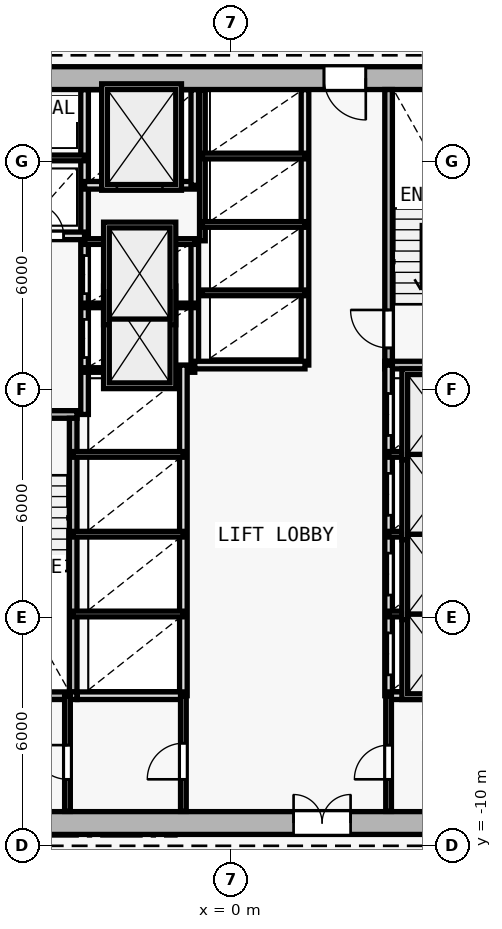
"""IFC4 building model, lengths in metres.
Left out: names, types, materials, properties, quantities, classifications, styles, units other than length and angle.
Written with IfcOpenShell. Run it as: python <this file> out.ifc"""

import sys

from ifc_helpers import new_model, si_unit, direction, frame, frame_2d, origin, origin_2d, place, context, subcontext, project, spatial, rectangle, i_section, extrude, element, fill, save


model = new_model("IFC4")
c1 = context("Model", 3, precision=1e-05, world=origin(), true_north=direction((0.0, 1.0)))
c2 = subcontext(c1, "Body", "Model", "MODEL_VIEW")
j1 = project(units=[si_unit("LENGTHUNIT", "METRE"), si_unit("PLANEANGLEUNIT", "RADIAN")], contexts=[c1])
p1 = place(None, origin())
s1 = spatial("IfcSite", under=j1, at=p1, CompositionType="ELEMENT")
p2 = place(p1, origin())
s2 = spatial("IfcBuilding", under=s1, at=p2, CompositionType="ELEMENT")
p3 = place(p2, frame((0.0, 0.0, 62.4)))
s3 = spatial("IfcBuildingStorey", under=s2, at=p3, CompositionType="ELEMENT", Elevation=62.4)
p4 = place(p3, frame((0.0, -9.4, 0.0), z_axis=(0.0, 0.0, 1.0), x_axis=(1.0, 0.0, 0.0)))
e1 = element("IfcColumn", 1, at=p4, inside=s3, PredefinedType="COLUMN", context=c2, shape_type="SweptSolid", body=[
    extrude(i_section(OverallWidth=0.416, OverallDepth=0.446, WebThickness=0.025, FlangeThickness=0.04, FilletRadius=0.015, at=origin_2d()), origin(), (0.0, 0.0, 1.0), 3.6),
])
p5 = place(p3, frame((-8.0, -9.4, 0.0), z_axis=(0.0, 0.0, 1.0), x_axis=(1.0, 0.0, 0.0)))
e2 = element("IfcWall", 2, at=p5, inside=s3, PredefinedType="SHEAR", context=c2, shape_type="SweptSolid", body=[
    extrude(rectangle(XDim=16.0, YDim=0.6, at=frame_2d((8.0, 0.0))), origin(), (0.0, 0.0, 1.0), 3.35),
])
p6 = place(p5, frame((9.65, 0.0, 0.0)))
e3 = element("IfcOpeningElement", 3, at=p6, cuts=e2, PredefinedType="OPENING", context=c2, shape_type="SweptSolid", body=[
    extrude(rectangle(XDim=1.5, YDim=2.2, at=frame_2d((0.75, 1.1))), frame((0.0, 0.31, 0.0), z_axis=(0.0, -1.0, 0.0), x_axis=(1.0, 0.0, 0.0)), (0.0, 0.0, 1.0), 0.62),
])
p7 = place(p3, frame((8.0, 10.2, 0.0), z_axis=(0.0, 0.0, 1.0), x_axis=(-1.0, 0.0, 0.0)))
e4 = element("IfcWall", 4, at=p7, inside=s3, PredefinedType="SHEAR", context=c2, shape_type="SweptSolid", body=[
    extrude(rectangle(XDim=16.0, YDim=0.6, at=frame_2d((8.0, 0.0))), origin(), (0.0, 0.0, 1.0), 3.35),
])
p8 = place(p7, frame((4.45, 0.0, 0.0)))
e5 = element("IfcOpeningElement", 5, at=p8, cuts=e4, PredefinedType="OPENING", context=c2, shape_type="SweptSolid", body=[
    extrude(rectangle(XDim=1.1, YDim=2.15, at=frame_2d((0.55, 1.075))), frame((0.0, 0.31, 0.0), z_axis=(0.0, -1.0, 0.0), x_axis=(1.0, 0.0, 0.0)), (0.0, 0.0, 1.0), 0.62),
])
p9 = place(p3, frame((-7.4, 1.35, 0.0), z_axis=(0.0, 0.0, 1.0), x_axis=(1.0, 0.0, 0.0)))
e6 = element("IfcWall", 6, at=p9, inside=s3, PredefinedType="SOLIDWALL", context=c2, shape_type="SweptSolid", body=[
    extrude(rectangle(XDim=3.35, YDim=0.2, at=frame_2d((1.675, 0.0))), origin(), (0.0, 0.0, 1.0), 3.35),
])
p10 = place(p9, frame((0.65, 0.0, 0.0)))
e7 = element("IfcOpeningElement", 7, at=p10, cuts=e6, PredefinedType="OPENING", context=c2, shape_type="SweptSolid", body=[
    extrude(rectangle(XDim=1.0, YDim=2.15, at=frame_2d((0.5, 1.075))), frame((0.0, 0.11, 0.0), z_axis=(0.0, -1.0, 0.0), x_axis=(1.0, 0.0, 0.0)), (0.0, 0.0, 1.0), 0.22),
])
p11 = place(p3, frame((-4.15, -5.95, 0.0), z_axis=(0.0, 0.0, 1.0), x_axis=(0.0, 1.0, 0.0)))
e8 = element("IfcWall", 8, at=p11, inside=s3, PredefinedType="SOLIDWALL", context=c2, shape_type="SweptSolid", body=[
    extrude(rectangle(XDim=7.2, YDim=0.2, at=frame_2d((3.6, 0.0))), origin(), (0.0, 0.0, 1.0), 3.35),
])
p12 = place(p3, frame((-3.85, 1.35, 0.0), z_axis=(0.0, 0.0, 1.0), x_axis=(0.0, 1.0, 0.0)))
e9 = element("IfcWall", 9, at=p12, inside=s3, PredefinedType="SOLIDWALL", context=c2, shape_type="SweptSolid", body=[
    extrude(rectangle(XDim=8.545, YDim=0.2, at=frame_2d((4.272, 0.0))), origin(), (0.0, 0.0, 1.0), 3.35),
])
p13 = place(p12, frame((1.5, 0.0, 0.0)))
e10 = element("IfcOpeningElement", 10, at=p13, cuts=e9, PredefinedType="OPENING", context=c2, shape_type="SweptSolid", body=[
    extrude(rectangle(XDim=1.0, YDim=2.15, at=frame_2d((0.5, 1.075))), frame((0.0, 0.11, 0.0), z_axis=(0.0, -1.0, 0.0), x_axis=(1.0, 0.0, 0.0)), (0.0, 0.0, 1.0), 0.22),
])
p14 = place(p12, frame((3.18, 0.0, 0.0)))
e11 = element("IfcOpeningElement", 11, at=p14, cuts=e9, PredefinedType="OPENING", context=c2, shape_type="SweptSolid", body=[
    extrude(rectangle(XDim=1.0, YDim=2.15, at=frame_2d((0.5, 1.075))), frame((0.0, 0.11, 0.0), z_axis=(0.0, -1.0, 0.0), x_axis=(1.0, 0.0, 0.0)), (0.0, 0.0, 1.0), 0.22),
])
p15 = place(p3, frame((-7.395, 6.05, 0.0), z_axis=(0.0, 0.0, 1.0), x_axis=(1.0, 0.0, 0.0)))
e12 = element("IfcWall", 12, at=p15, inside=s3, PredefinedType="SOLIDWALL", context=c2, shape_type="SweptSolid", body=[
    extrude(rectangle(XDim=3.545, YDim=0.2, at=frame_2d((1.772, 0.0))), origin(), (0.0, 0.0, 1.0), 3.35),
])
p16 = place(p15, frame((0.345, 0.0, 0.0)))
e13 = element("IfcOpeningElement", 13, at=p16, cuts=e12, PredefinedType="OPENING", context=c2, shape_type="SweptSolid", body=[
    extrude(rectangle(XDim=0.85, YDim=2.1, at=frame_2d((0.425, 1.05))), frame((0.0, 0.11, 0.0), z_axis=(0.0, -1.0, 0.0), x_axis=(1.0, 0.0, 0.0)), (0.0, 0.0, 1.0), 0.22),
])
p17 = place(p15, frame((2.145, 0.0, 0.0)))
e14 = element("IfcOpeningElement", 14, at=p17, cuts=e12, PredefinedType="OPENING", context=c2, shape_type="SweptSolid", body=[
    extrude(rectangle(XDim=0.85, YDim=2.1, at=frame_2d((0.425, 1.05))), frame((0.0, 0.11, 0.0), z_axis=(0.0, -1.0, 0.0), x_axis=(1.0, 0.0, 0.0)), (0.0, 0.0, 1.0), 0.22),
])
p18 = place(p3, frame((-7.395, 8.1, 0.0), z_axis=(0.0, 0.0, 1.0), x_axis=(1.0, 0.0, 0.0)))
e15 = element("IfcWall", 15, at=p18, inside=s3, PredefinedType="PARTITIONING", context=c2, shape_type="SweptSolid", body=[
    extrude(rectangle(XDim=3.545, YDim=0.15, at=frame_2d((1.772, 0.0))), origin(), (0.0, 0.0, 1.0), 3.35),
])
p19 = place(p3, frame((4.15, 2.75, 0.0), z_axis=(0.0, 0.0, 1.0), x_axis=(0.0, 1.0, 0.0)))
e16 = element("IfcWall", 16, at=p19, inside=s3, PredefinedType="SOLIDWALL", context=c2, shape_type="SweptSolid", body=[
    extrude(rectangle(XDim=7.15, YDim=0.2, at=frame_2d((3.575, 0.0))), origin(), (0.0, 0.0, 1.0), 3.35),
])
p20 = place(p19, frame((0.35, 0.0, 0.0)))
e17 = element("IfcOpeningElement", 17, at=p20, cuts=e16, PredefinedType="OPENING", context=c2, shape_type="SweptSolid", body=[
    extrude(rectangle(XDim=1.0, YDim=2.15, at=frame_2d((0.5, 1.075))), frame((0.0, 0.11, 0.0), z_axis=(0.0, -1.0, 0.0), x_axis=(1.0, 0.0, 0.0)), (0.0, 0.0, 1.0), 0.22),
])
p21 = place(p3, frame((4.05, 2.65, 0.0), z_axis=(0.0, 0.0, 1.0), x_axis=(1.0, 0.0, 0.0)))
e18 = element("IfcWall", 18, at=p21, inside=s3, PredefinedType="SOLIDWALL", context=c2, shape_type="SweptSolid", body=[
    extrude(rectangle(XDim=3.35, YDim=0.2, at=frame_2d((1.675, 0.0))), origin(), (0.0, 0.0, 1.0), 3.35),
])
p22 = place(p3, frame((-0.95, 2.65, 0.0), z_axis=(0.0, 0.0, 1.0), x_axis=(0.0, 1.0, 0.0)))
e19 = element("IfcWall", 19, at=p22, inside=s3, PredefinedType="SOLIDWALL", context=c2, shape_type="SweptSolid", body=[
    extrude(rectangle(XDim=3.27, YDim=0.2, at=frame_2d((1.635, 0.0))), origin(), (0.0, 0.0, 1.0), 3.35),
])
for number, where, z_axis, x_axis in (
    (20, (-3.85, 2.52, 0.0), (0.0, 0.0, 1.0), (1.0, 0.0, 0.0)),
    (21, (-3.85, 4.22, 0.0), (0.0, 0.0, 1.0), (1.0, 0.0, 0.0)),
):
    element("IfcWall", number, at=place(p3, frame(where, z_axis=z_axis, x_axis=x_axis)), inside=s3, PredefinedType="PARTITIONING", context=c2, shape_type="SweptSolid", body=[
        extrude(rectangle(XDim=2.9, YDim=0.12, at=frame_2d((1.45, 0.0))), origin(), (0.0, 0.0, 1.0), 3.35),
    ])
p23 = place(p3, frame((-3.85, 5.9, 0.0), z_axis=(0.0, 0.0, 1.0), x_axis=(1.0, 0.0, 0.0)))
e22 = element("IfcWall", 22, at=p23, inside=s3, PredefinedType="PARTITIONING", context=c2, shape_type="SweptSolid", body=[
    extrude(rectangle(XDim=2.9, YDim=0.15, at=frame_2d((1.45, 0.0))), origin(), (0.0, 0.0, 1.0), 3.35),
])
p24 = place(p3, frame((-3.85, 7.38, 0.0), z_axis=(0.0, 0.0, 1.0), x_axis=(1.0, 0.0, 0.0)))
e23 = element("IfcWall", 23, at=p24, inside=s3, PredefinedType="SOLIDWALL", context=c2, shape_type="SweptSolid", body=[
    extrude(rectangle(XDim=2.9, YDim=0.2, at=frame_2d((1.45, 0.0))), origin(), (0.0, 0.0, 1.0), 3.35),
])
p25 = place(p24, frame((0.85, 0.0, 0.0)))
e24 = element("IfcOpeningElement", 24, at=p25, cuts=e23, PredefinedType="OPENING", context=c2, shape_type="SweptSolid", body=[
    extrude(rectangle(XDim=1.2, YDim=2.2, at=frame_2d((0.6, 1.1))), frame((0.0, 0.11, 0.0), z_axis=(0.0, -1.0, 0.0), x_axis=(1.0, 0.0, 0.0)), (0.0, 0.0, 1.0), 0.22),
])
p26 = place(p3, frame((-0.95, 7.38, 0.0), z_axis=(0.0, 0.0, 1.0), x_axis=(0.0, 1.0, 0.0)))
e25 = element("IfcWall", 25, at=p26, inside=s3, PredefinedType="SOLIDWALL", context=c2, shape_type="SweptSolid", body=[
    extrude(rectangle(XDim=2.515, YDim=0.2, at=frame_2d((1.258, 0.0))), origin(), (0.0, 0.0, 1.0), 3.35),
])
p27 = place(p3, frame((4.15, -6.05, 0.0), z_axis=(0.0, 0.0, 1.0), x_axis=(0.0, 1.0, 0.0)))
e26 = element("IfcWall", 26, at=p27, inside=s3, PredefinedType="SOLIDWALL", context=c2, shape_type="SweptSolid", body=[
    extrude(rectangle(XDim=8.7, YDim=0.2, at=frame_2d((4.35, 0.0))), origin(), (0.0, 0.0, 1.0), 3.35),
])
p28 = place(p27, frame((0.55, 0.0, 0.0)))
e27 = element("IfcOpeningElement", 27, at=p28, cuts=e26, PredefinedType="OPENING", context=c2, shape_type="SweptSolid", body=[
    extrude(rectangle(XDim=1.1, YDim=2.15, at=frame_2d((0.55, 1.075))), frame((0.0, 0.11, 0.0), z_axis=(0.0, -1.0, 0.0), x_axis=(1.0, 0.0, 0.0)), (0.0, 0.0, 1.0), 0.22),
])
p29 = place(p27, frame((2.65, 0.0, 0.0)))
e28 = element("IfcOpeningElement", 28, at=p29, cuts=e26, PredefinedType="OPENING", context=c2, shape_type="SweptSolid", body=[
    extrude(rectangle(XDim=1.1, YDim=2.15, at=frame_2d((0.55, 1.075))), frame((0.0, 0.11, 0.0), z_axis=(0.0, -1.0, 0.0), x_axis=(1.0, 0.0, 0.0)), (0.0, 0.0, 1.0), 0.22),
])
p30 = place(p27, frame((4.75, 0.0, 0.0)))
e29 = element("IfcOpeningElement", 29, at=p30, cuts=e26, PredefinedType="OPENING", context=c2, shape_type="SweptSolid", body=[
    extrude(rectangle(XDim=1.1, YDim=2.15, at=frame_2d((0.55, 1.075))), frame((0.0, 0.11, 0.0), z_axis=(0.0, -1.0, 0.0), x_axis=(1.0, 0.0, 0.0)), (0.0, 0.0, 1.0), 0.22),
])
p31 = place(p27, frame((6.85, 0.0, 0.0)))
e30 = element("IfcOpeningElement", 30, at=p31, cuts=e26, PredefinedType="OPENING", context=c2, shape_type="SweptSolid", body=[
    extrude(rectangle(XDim=1.1, YDim=2.15, at=frame_2d((0.55, 1.075))), frame((0.0, 0.11, 0.0), z_axis=(0.0, -1.0, 0.0), x_axis=(1.0, 0.0, 0.0)), (0.0, 0.0, 1.0), 0.22),
])
for number, where, z_axis, x_axis in (
    (31, (4.15, -3.9, 0.0), (0.0, 0.0, 1.0), (1.0, 0.0, 0.0)),
    (32, (4.15, -1.8, 0.0), (0.0, 0.0, 1.0), (1.0, 0.0, 0.0)),
    (33, (4.15, 0.3, 0.0), (0.0, 0.0, 1.0), (1.0, 0.0, 0.0)),
):
    element("IfcWall", number, at=place(p3, frame(where, z_axis=z_axis, x_axis=x_axis)), inside=s3, PredefinedType="PARTITIONING", context=c2, shape_type="SweptSolid", body=[
        extrude(rectangle(XDim=2.6, YDim=0.15, at=frame_2d((1.3, 0.0))), origin(), (0.0, 0.0, 1.0), 3.35),
    ])
p32 = place(p3, frame((-1.25, -6.05, 0.0), z_axis=(0.0, 0.0, 1.0), x_axis=(0.0, 1.0, 0.0)))
e34 = element("IfcWall", 34, at=p32, inside=s3, PredefinedType="SOLIDWALL", context=c2, shape_type="SweptSolid", body=[
    extrude(rectangle(XDim=8.7, YDim=0.2, at=frame_2d((4.35, 0.0))), origin(), (0.0, 0.0, 1.0), 3.35),
])
for number, where, z_axis, x_axis in (
    (35, (-4.15, -3.9, 0.0), (0.0, 0.0, 1.0), (1.0, 0.0, 0.0)),
    (36, (-4.15, -1.8, 0.0), (0.0, 0.0, 1.0), (1.0, 0.0, 0.0)),
    (37, (-4.15, 0.3, 0.0), (0.0, 0.0, 1.0), (1.0, 0.0, 0.0)),
):
    element("IfcWall", number, at=place(p3, frame(where, z_axis=z_axis, x_axis=x_axis)), inside=s3, PredefinedType="PARTITIONING", context=c2, shape_type="SweptSolid", body=[
        extrude(rectangle(XDim=2.9, YDim=0.15, at=frame_2d((1.45, 0.0))), origin(), (0.0, 0.0, 1.0), 3.35),
    ])
p33 = place(p3, frame((1.95, 2.65, 0.0), z_axis=(0.0, 0.0, 1.0), x_axis=(0.0, 1.0, 0.0)))
e38 = element("IfcWall", 38, at=p33, inside=s3, PredefinedType="SOLIDWALL", context=c2, shape_type="SweptSolid", body=[
    extrude(rectangle(XDim=7.245, YDim=0.2, at=frame_2d((3.623, 0.0))), origin(), (0.0, 0.0, 1.0), 3.35),
])
p34 = place(p3, frame((-0.95, 2.65, 0.0), z_axis=(0.0, 0.0, 1.0), x_axis=(1.0, 0.0, 0.0)))
e39 = element("IfcWall", 39, at=p34, inside=s3, PredefinedType="SOLIDWALL", context=c2, shape_type="SweptSolid", body=[
    extrude(rectangle(XDim=2.9, YDim=0.2, at=frame_2d((1.45, 0.0))), origin(), (0.0, 0.0, 1.0), 3.35),
])
p35 = place(p3, frame((-0.75, 5.92, 0.0), z_axis=(0.0, 0.0, 1.0), x_axis=(0.0, 1.0, 0.0)))
e40 = element("IfcWall", 40, at=p35, inside=s3, PredefinedType="PARTITIONING", context=c2, shape_type="SweptSolid", body=[
    extrude(rectangle(XDim=3.975, YDim=0.15, at=frame_2d((1.988, 0.0))), origin(), (0.0, 0.0, 1.0), 3.35),
])
for number, where, z_axis, x_axis in (
    (41, (-0.75, 4.55, 0.0), (0.0, 0.0, 1.0), (1.0, 0.0, 0.0)),
    (42, (-0.75, 6.35, 0.0), (0.0, 0.0, 1.0), (1.0, 0.0, 0.0)),
    (43, (-0.75, 8.15, 0.0), (0.0, 0.0, 1.0), (1.0, 0.0, 0.0)),
):
    element("IfcWall", number, at=place(p3, frame(where, z_axis=z_axis, x_axis=x_axis)), inside=s3, PredefinedType="PARTITIONING", context=c2, shape_type="SweptSolid", body=[
        extrude(rectangle(XDim=2.7, YDim=0.15, at=frame_2d((1.35, 0.0))), origin(), (0.0, 0.0, 1.0), 3.35),
    ])
p36 = place(p3, frame((-7.4, -6.05, 0.0), z_axis=(0.0, 0.0, 1.0), x_axis=(1.0, 0.0, 0.0)))
e44 = element("IfcWall", 44, at=p36, inside=s3, PredefinedType="SOLIDWALL", context=c2, shape_type="SweptSolid", body=[
    extrude(rectangle(XDim=3.35, YDim=0.2, at=frame_2d((1.675, 0.0))), origin(), (0.0, 0.0, 1.0), 3.35),
])
p37 = place(p3, frame((-4.04, -6.05, 0.0), z_axis=(0.0, 0.0, 1.0), x_axis=(1.0, 0.0, 0.0)))
e45 = element("IfcWall", 45, at=p37, inside=s3, PredefinedType="SOLIDWALL", context=c2, shape_type="SweptSolid", body=[
    extrude(rectangle(XDim=2.79, YDim=0.2, at=frame_2d((1.395, 0.0))), origin(), (0.0, 0.0, 1.0), 3.35),
])
p38 = place(p3, frame((4.15, -6.05, 0.0), z_axis=(0.0, 0.0, 1.0), x_axis=(1.0, 0.0, 0.0)))
e46 = element("IfcWall", 46, at=p38, inside=s3, PredefinedType="SOLIDWALL", context=c2, shape_type="SweptSolid", body=[
    extrude(rectangle(XDim=3.245, YDim=0.2, at=frame_2d((1.623, 0.0))), origin(), (0.0, 0.0, 1.0), 3.35),
])
p39 = place(p3, frame((-1.25, -9.095, 0.0), z_axis=(0.0, 0.0, 1.0), x_axis=(0.0, 1.0, 0.0)))
e47 = element("IfcWall", 47, at=p39, inside=s3, PredefinedType="PARTITIONING", context=c2, shape_type="SweptSolid", body=[
    extrude(rectangle(XDim=3.045, YDim=0.15, at=frame_2d((1.522, 0.0))), origin(), (0.0, 0.0, 1.0), 3.35),
])
p40 = place(p39, frame((0.845, 0.0, 0.0)))
e48 = element("IfcOpeningElement", 48, at=p40, cuts=e47, PredefinedType="OPENING", context=c2, shape_type="SweptSolid", body=[
    extrude(rectangle(XDim=0.95, YDim=2.1, at=frame_2d((0.475, 1.05))), frame((0.0, 0.085, 0.0), z_axis=(0.0, -1.0, 0.0), x_axis=(1.0, 0.0, 0.0)), (0.0, 0.0, 1.0), 0.17),
])
p41 = place(p3, frame((4.15, -9.095, 0.0), z_axis=(0.0, 0.0, 1.0), x_axis=(0.0, 1.0, 0.0)))
e49 = element("IfcWall", 49, at=p41, inside=s3, PredefinedType="PARTITIONING", context=c2, shape_type="SweptSolid", body=[
    extrude(rectangle(XDim=3.045, YDim=0.15, at=frame_2d((1.522, 0.0))), origin(), (0.0, 0.0, 1.0), 3.35),
])
p42 = place(p41, frame((0.845, 0.0, 0.0)))
e50 = element("IfcOpeningElement", 50, at=p42, cuts=e49, PredefinedType="OPENING", context=c2, shape_type="SweptSolid", body=[
    extrude(rectangle(XDim=0.9, YDim=2.1, at=frame_2d((0.45, 1.05))), frame((0.0, 0.085, 0.0), z_axis=(0.0, -1.0, 0.0), x_axis=(1.0, 0.0, 0.0)), (0.0, 0.0, 1.0), 0.17),
])
p43 = place(p3, frame((-4.3, -9.095, 0.0), z_axis=(0.0, 0.0, 1.0), x_axis=(0.0, 1.0, 0.0)))
e51 = element("IfcWall", 51, at=p43, inside=s3, PredefinedType="PARTITIONING", context=c2, shape_type="SweptSolid", body=[
    extrude(rectangle(XDim=3.045, YDim=0.15, at=frame_2d((1.522, 0.0))), origin(), (0.0, 0.0, 1.0), 3.35),
])
p44 = place(p43, frame((0.845, 0.0, 0.0)))
e52 = element("IfcOpeningElement", 52, at=p44, cuts=e51, PredefinedType="OPENING", context=c2, shape_type="SweptSolid", body=[
    extrude(rectangle(XDim=0.9, YDim=2.1, at=frame_2d((0.45, 1.05))), frame((0.0, 0.085, 0.0), z_axis=(0.0, -1.0, 0.0), x_axis=(1.0, 0.0, 0.0)), (0.0, 0.0, 1.0), 0.17),
])
p45 = place(p6, origin())
e53 = element("IfcDoor", 53, at=p45, inside=s3, OperationType="DOUBLE_DOOR_SINGLE_SWING", PredefinedType="DOOR", context=c2, shape_type="SweptSolid", body=[
    extrude(rectangle(XDim=1.5, YDim=2.2, at=frame_2d((0.75, 1.1))), frame((0.0, 0.025, 0.0), z_axis=(0.0, -1.0, 0.0), x_axis=(1.0, 0.0, 0.0)), (0.0, 0.0, 1.0), 0.05),
])
fill(e3, e53)
p46 = place(p8, origin())
e54 = element("IfcDoor", 54, at=p46, inside=s3, OperationType="SINGLE_SWING_LEFT", PredefinedType="DOOR", context=c2, shape_type="SweptSolid", body=[
    extrude(rectangle(XDim=1.1, YDim=2.15, at=frame_2d((0.55, 1.075))), frame((0.0, 0.025, 0.0), z_axis=(0.0, -1.0, 0.0), x_axis=(1.0, 0.0, 0.0)), (0.0, 0.0, 1.0), 0.05),
])
fill(e5, e54)
p47 = place(p17, origin())
e55 = element("IfcDoor", 55, at=p47, inside=s3, OperationType="SINGLE_SWING_LEFT", PredefinedType="DOOR", context=c2, shape_type="SweptSolid", body=[
    extrude(rectangle(XDim=0.85, YDim=2.1, at=frame_2d((0.425, 1.05))), frame((0.0, 0.025, 0.0), z_axis=(0.0, -1.0, 0.0), x_axis=(1.0, 0.0, 0.0)), (0.0, 0.0, 1.0), 0.05),
])
fill(e14, e55)
p48 = place(p20, origin())
e56 = element("IfcDoor", 56, at=p48, inside=s3, OperationType="SINGLE_SWING_RIGHT", PredefinedType="DOOR", context=c2, shape_type="SweptSolid", body=[
    extrude(rectangle(XDim=1.0, YDim=2.15, at=frame_2d((0.5, 1.075))), frame((0.0, 0.025, 0.0), z_axis=(0.0, -1.0, 0.0), x_axis=(1.0, 0.0, 0.0)), (0.0, 0.0, 1.0), 0.05),
])
fill(e17, e56)
p49 = place(p25, origin())
e57 = element("IfcDoor", 57, at=p49, inside=s3, OperationType="DOUBLE_DOOR_SLIDING", PredefinedType="DOOR", context=c2, shape_type="SweptSolid", body=[
    extrude(rectangle(XDim=1.2, YDim=2.2, at=frame_2d((0.6, 1.1))), frame((0.0, 0.025, 0.0), z_axis=(0.0, -1.0, 0.0), x_axis=(1.0, 0.0, 0.0)), (0.0, 0.0, 1.0), 0.05),
])
fill(e24, e57)
p50 = place(p28, origin())
e58 = element("IfcDoor", 58, at=p50, inside=s3, OperationType="DOUBLE_DOOR_SLIDING", PredefinedType="DOOR", context=c2, shape_type="SweptSolid", body=[
    extrude(rectangle(XDim=1.1, YDim=2.15, at=frame_2d((0.55, 1.075))), frame((0.0, 0.025, 0.0), z_axis=(0.0, -1.0, 0.0), x_axis=(1.0, 0.0, 0.0)), (0.0, 0.0, 1.0), 0.05),
])
fill(e27, e58)
p51 = place(p29, origin())
e59 = element("IfcDoor", 59, at=p51, inside=s3, OperationType="DOUBLE_DOOR_SLIDING", PredefinedType="DOOR", context=c2, shape_type="SweptSolid", body=[
    extrude(rectangle(XDim=1.1, YDim=2.15, at=frame_2d((0.55, 1.075))), frame((0.0, 0.025, 0.0), z_axis=(0.0, -1.0, 0.0), x_axis=(1.0, 0.0, 0.0)), (0.0, 0.0, 1.0), 0.05),
])
fill(e28, e59)
p52 = place(p30, origin())
e60 = element("IfcDoor", 60, at=p52, inside=s3, OperationType="DOUBLE_DOOR_SLIDING", PredefinedType="DOOR", context=c2, shape_type="SweptSolid", body=[
    extrude(rectangle(XDim=1.1, YDim=2.15, at=frame_2d((0.55, 1.075))), frame((0.0, 0.025, 0.0), z_axis=(0.0, -1.0, 0.0), x_axis=(1.0, 0.0, 0.0)), (0.0, 0.0, 1.0), 0.05),
])
fill(e29, e60)
p53 = place(p31, origin())
e61 = element("IfcDoor", 61, at=p53, inside=s3, OperationType="DOUBLE_DOOR_SLIDING", PredefinedType="DOOR", context=c2, shape_type="SweptSolid", body=[
    extrude(rectangle(XDim=1.1, YDim=2.15, at=frame_2d((0.55, 1.075))), frame((0.0, 0.025, 0.0), z_axis=(0.0, -1.0, 0.0), x_axis=(1.0, 0.0, 0.0)), (0.0, 0.0, 1.0), 0.05),
])
fill(e30, e61)
p54 = place(p13, origin())
e62 = element("IfcDoor", 62, at=p54, inside=s3, OperationType="DOUBLE_DOOR_SLIDING", PredefinedType="DOOR", context=c2, shape_type="SweptSolid", body=[
    extrude(rectangle(XDim=1.0, YDim=2.15, at=frame_2d((0.5, 1.075))), frame((0.0, 0.025, 0.0), z_axis=(0.0, -1.0, 0.0), x_axis=(1.0, 0.0, 0.0)), (0.0, 0.0, 1.0), 0.05),
])
fill(e10, e62)
p55 = place(p14, origin())
e63 = element("IfcDoor", 63, at=p55, inside=s3, OperationType="DOUBLE_DOOR_SLIDING", PredefinedType="DOOR", context=c2, shape_type="SweptSolid", body=[
    extrude(rectangle(XDim=1.0, YDim=2.15, at=frame_2d((0.5, 1.075))), frame((0.0, 0.025, 0.0), z_axis=(0.0, -1.0, 0.0), x_axis=(1.0, 0.0, 0.0)), (0.0, 0.0, 1.0), 0.05),
])
fill(e11, e63)
p56 = place(p40, origin())
e64 = element("IfcDoor", 64, at=p56, inside=s3, OperationType="SINGLE_SWING_LEFT", PredefinedType="DOOR", context=c2, shape_type="SweptSolid", body=[
    extrude(rectangle(XDim=0.95, YDim=2.1, at=frame_2d((0.475, 1.05))), frame((0.0, 0.025, 0.0), z_axis=(0.0, -1.0, 0.0), x_axis=(1.0, 0.0, 0.0)), (0.0, 0.0, 1.0), 0.05),
])
fill(e48, e64)
p57 = place(p44, origin())
e65 = element("IfcDoor", 65, at=p57, inside=s3, OperationType="SINGLE_SWING_RIGHT", PredefinedType="DOOR", context=c2, shape_type="SweptSolid", body=[
    extrude(rectangle(XDim=0.9, YDim=2.1, at=frame_2d((0.45, 1.05))), frame((0.0, 0.025, 0.0), z_axis=(0.0, -1.0, 0.0), x_axis=(1.0, 0.0, 0.0)), (0.0, 0.0, 1.0), 0.05),
])
fill(e52, e65)
p58 = place(p42, origin())
e66 = element("IfcDoor", 66, at=p58, inside=s3, OperationType="SINGLE_SWING_LEFT", PredefinedType="DOOR", context=c2, shape_type="SweptSolid", body=[
    extrude(rectangle(XDim=0.9, YDim=2.1, at=frame_2d((0.45, 1.05))), frame((0.0, 0.025, 0.0), z_axis=(0.0, -1.0, 0.0), x_axis=(1.0, 0.0, 0.0)), (0.0, 0.0, 1.0), 0.05),
])
fill(e50, e66)
save(model, sys.argv[1])
